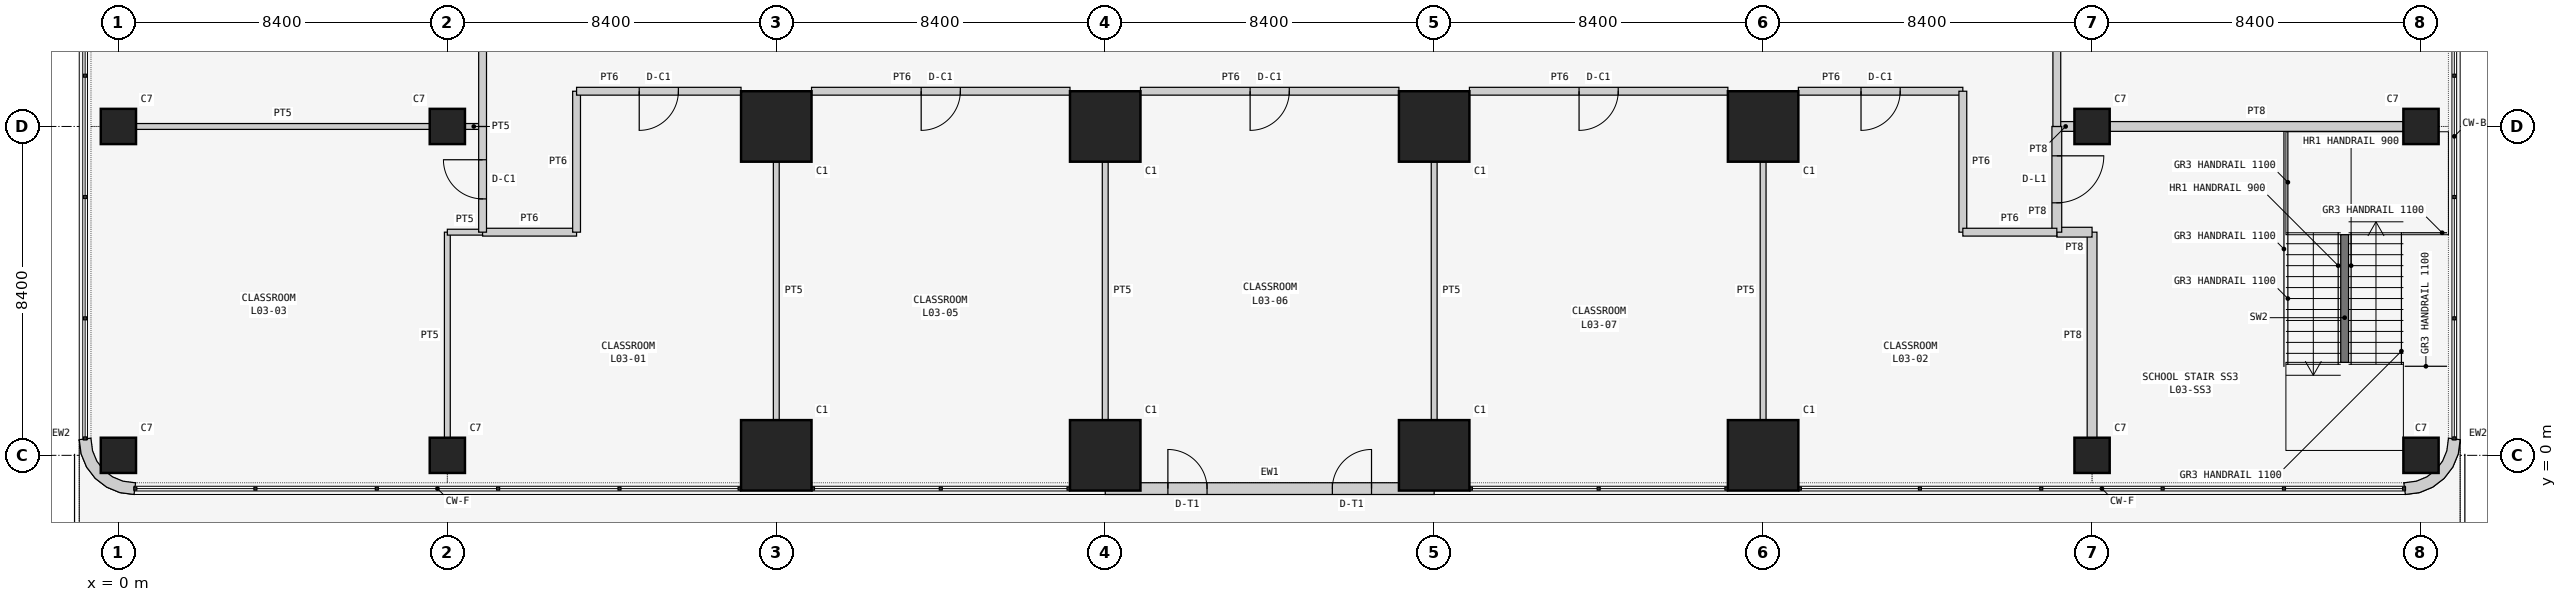
"""IFC4 building model, lengths in metres.
Left out: names, types, materials, properties, quantities, classifications, styles, units other than length and angle.
Written with IfcOpenShell. Run it as: python <this file> out.ifc"""

import sys

from ifc_helpers import new_model, si_unit, direction, frame, frame_2d, origin, origin_2d, place, context, subcontext, project, spatial, polyline, rectangle, outline, extrude, element, fill, save


model = new_model("IFC4")
c1 = context("Model", 3, precision=1e-05, world=origin(), true_north=direction((0.0, 1.0)))
c2 = subcontext(c1, "Body", "Model", "MODEL_VIEW")
j1 = project(units=[si_unit("LENGTHUNIT", "METRE"), si_unit("PLANEANGLEUNIT", "RADIAN")], contexts=[c1])
p1 = place(None, origin())
s1 = spatial("IfcSite", under=j1, at=p1, CompositionType="ELEMENT")
p2 = place(p1, origin())
s2 = spatial("IfcBuilding", under=s1, at=p2, CompositionType="ELEMENT")
p3 = place(p2, frame((0.0, 0.0, 15.0)))
s3 = spatial("IfcBuildingStorey", under=s2, at=p3, CompositionType="ELEMENT", Elevation=15.0)
for number, where, z_axis, x_axis in (
    (1, (0.0, 0.0, 0.0), (0.0, 0.0, 1.0), (1.0, 0.0, 0.0)),
    (2, (0.0, 8.4, 0.0), (0.0, 0.0, 1.0), (1.0, 0.0, 0.0)),
    (3, (8.4, 0.0, 0.0), (0.0, 0.0, 1.0), (1.0, 0.0, 0.0)),
    (4, (8.4, 8.4, 0.0), (0.0, 0.0, 1.0), (1.0, 0.0, 0.0)),
):
    element("IfcColumn", number, at=place(p3, frame(where, z_axis=z_axis, x_axis=x_axis)), inside=s3, PredefinedType="COLUMN", context=c2, shape_type="SweptSolid", body=[
        extrude(rectangle(XDim=0.9, YDim=0.9, at=origin_2d()), origin(), (0.0, 0.0, 1.0), 4.5),
    ])
for number, where, z_axis, x_axis in (
    (5, (16.8, 0.0, 0.0), (0.0, 0.0, 1.0), (1.0, 0.0, 0.0)),
    (6, (16.8, 8.4, 0.0), (0.0, 0.0, 1.0), (1.0, 0.0, 0.0)),
    (7, (25.2, 0.0, 0.0), (0.0, 0.0, 1.0), (1.0, 0.0, 0.0)),
    (8, (25.2, 8.4, 0.0), (0.0, 0.0, 1.0), (1.0, 0.0, 0.0)),
    (9, (33.6, 0.0, 0.0), (0.0, 0.0, 1.0), (1.0, 0.0, 0.0)),
    (10, (33.6, 8.4, 0.0), (0.0, 0.0, 1.0), (1.0, 0.0, 0.0)),
    (11, (42.0, 0.0, 0.0), (0.0, 0.0, 1.0), (1.0, 0.0, 0.0)),
    (12, (42.0, 8.4, 0.0), (0.0, 0.0, 1.0), (1.0, 0.0, 0.0)),
):
    element("IfcColumn", number, at=place(p3, frame(where, z_axis=z_axis, x_axis=x_axis)), inside=s3, PredefinedType="COLUMN", context=c2, shape_type="SweptSolid", body=[
        extrude(rectangle(XDim=1.8, YDim=1.8, at=origin_2d()), origin(), (0.0, 0.0, 1.0), 4.5),
    ])
for number, where, z_axis, x_axis in (
    (13, (50.4, 0.0, 0.0), (0.0, 0.0, 1.0), (1.0, 0.0, 0.0)),
    (14, (50.4, 8.4, 0.0), (0.0, 0.0, 1.0), (1.0, 0.0, 0.0)),
    (15, (58.8, 0.0, 0.0), (0.0, 0.0, 1.0), (1.0, 0.0, 0.0)),
    (16, (58.8, 8.4, 0.0), (0.0, 0.0, 1.0), (1.0, 0.0, 0.0)),
):
    element("IfcColumn", number, at=place(p3, frame(where, z_axis=z_axis, x_axis=x_axis)), inside=s3, PredefinedType="COLUMN", context=c2, shape_type="SweptSolid", body=[
        extrude(rectangle(XDim=0.9, YDim=0.9, at=origin_2d()), origin(), (0.0, 0.0, 1.0), 4.5),
    ])
p4 = place(p3, frame((25.2, -0.85, 0.0), z_axis=(0.0, 0.0, 1.0), x_axis=(1.0, 0.0, 0.0)))
e17 = element("IfcWall", 17, at=p4, inside=s3, PredefinedType="SOLIDWALL", context=c2, shape_type="SweptSolid", body=[
    extrude(rectangle(XDim=8.4, YDim=0.3, at=frame_2d((4.2, 0.0))), origin(), (0.0, 0.0, 1.0), 4.3),
])
p5 = place(p4, frame((1.6, 0.0, 0.0)))
e18 = element("IfcOpeningElement", 18, at=p5, cuts=e17, PredefinedType="OPENING", context=c2, shape_type="SweptSolid", body=[
    extrude(rectangle(XDim=1.0, YDim=2.4, at=frame_2d((0.5, 1.2))), frame((0.0, 0.16, 0.0), z_axis=(0.0, -1.0, 0.0), x_axis=(1.0, 0.0, 0.0)), (0.0, 0.0, 1.0), 0.32),
])
p6 = place(p4, frame((5.8, 0.0, 0.0)))
e19 = element("IfcOpeningElement", 19, at=p6, cuts=e17, PredefinedType="OPENING", context=c2, shape_type="SweptSolid", body=[
    extrude(rectangle(XDim=1.0, YDim=2.4, at=frame_2d((0.5, 1.2))), frame((0.0, 0.16, 0.0), z_axis=(0.0, -1.0, 0.0), x_axis=(1.0, 0.0, 0.0)), (0.0, 0.0, 1.0), 0.32),
])
p7 = place(p3, frame((-0.848, 0.445, 0.0), z_axis=(0.0, 0.0, 1.0), x_axis=(-0.707106781187, -0.707106781187, 0.0)))
e20 = element("IfcWall", 20, at=p7, inside=s3, PredefinedType="SOLIDWALL", context=c2, shape_type="SweptSolid", body=[
    extrude(outline(polyline([(0.139, 1.904), (-0.101, 1.72), (-0.087, 1.706), (0.1, 1.463), (0.209, 1.198), (0.247, 0.914), (0.209, 0.63), (0.1, 0.365), (-0.087, 0.122), (-0.101, 0.108), (0.139, -0.076), (0.362, 0.214), (0.502, 0.552), (0.549, 0.914), (0.502, 1.276), (0.362, 1.614), (0.139, 1.904)])), origin(), (0.0, 0.0, 1.0), 4.3),
])
p8 = place(p3, frame((58.355, -0.848, 0.0), z_axis=(0.0, 0.0, 1.0), x_axis=(0.707106781187, -0.707106781187, 0.0)))
e21 = element("IfcWall", 21, at=p8, inside=s3, PredefinedType="SOLIDWALL", context=c2, shape_type="SweptSolid", body=[
    extrude(outline(polyline([(0.139, 1.904), (-0.101, 1.72), (-0.087, 1.706), (0.1, 1.463), (0.209, 1.198), (0.247, 0.914), (0.209, 0.63), (0.1, 0.365), (-0.087, 0.122), (-0.101, 0.108), (0.139, -0.076), (0.362, 0.214), (0.502, 0.552), (0.549, 0.914), (0.502, 1.276), (0.362, 1.614), (0.139, 1.904)])), origin(), (0.0, 0.0, 1.0), 4.3),
])
p9 = place(p3, frame((50.4, 0.45, 0.0), z_axis=(0.0, 0.0, 1.0), x_axis=(0.0, 1.0, 0.0)))
e22 = element("IfcWall", 22, at=p9, inside=s3, PredefinedType="SOLIDWALL", context=c2, shape_type="SweptSolid", body=[
    extrude(rectangle(XDim=5.25, YDim=0.25, at=frame_2d((2.625, 0.0))), origin(), (0.0, 0.0, 1.0), 3.543),
])
p10 = place(p3, frame((50.4, 5.7, 0.0), z_axis=(0.0, 0.0, 1.0), x_axis=(-1.0, 0.0, 0.0)))
e23 = element("IfcWall", 23, at=p10, inside=s3, PredefinedType="SOLIDWALL", context=c2, shape_type="SweptSolid", body=[
    extrude(rectangle(XDim=0.9, YDim=0.25, at=frame_2d((0.45, 0.0))), origin(), (0.0, 0.0, 1.0), 4.3),
])
p11 = place(p3, frame((49.5, 8.4, 0.0), z_axis=(0.0, 0.0, 1.0), x_axis=(1.0, 0.0, 0.0)))
e24 = element("IfcWall", 24, at=p11, inside=s3, PredefinedType="SOLIDWALL", context=c2, shape_type="SweptSolid", body=[
    extrude(rectangle(XDim=0.45, YDim=0.25, at=frame_2d((0.225, 0.0))), origin(), (0.0, 0.0, 1.0), 3.543),
])
p12 = place(p3, frame((50.85, 8.4, 0.0), z_axis=(0.0, 0.0, 1.0), x_axis=(1.0, 0.0, 0.0)))
e25 = element("IfcWall", 25, at=p12, inside=s3, PredefinedType="SOLIDWALL", context=c2, shape_type="SweptSolid", body=[
    extrude(rectangle(XDim=7.5, YDim=0.25, at=frame_2d((3.75, 0.0))), origin(), (0.0, 0.0, 1.0), 3.543),
])
p13 = place(p3, frame((49.5, 5.7, 0.0), z_axis=(0.0, 0.0, 1.0), x_axis=(0.0, 1.0, 0.0)))
e26 = element("IfcWall", 26, at=p13, inside=s3, PredefinedType="SOLIDWALL", context=c2, shape_type="SweptSolid", body=[
    extrude(rectangle(XDim=2.7, YDim=0.25, at=frame_2d((1.35, 0.0))), origin(), (0.0, 0.0, 1.0), 4.3),
])
p14 = place(p13, frame((0.75, 0.0, 0.0)))
e27 = element("IfcOpeningElement", 27, at=p14, cuts=e26, PredefinedType="OPENING", context=c2, shape_type="SweptSolid", body=[
    extrude(rectangle(XDim=1.2, YDim=2.1, at=frame_2d((0.6, 1.05))), frame((0.0, 0.135, 0.0), z_axis=(0.0, -1.0, 0.0), x_axis=(1.0, 0.0, 0.0)), (0.0, 0.0, 1.0), 0.27),
])
p15 = place(p3, frame((8.4, 0.45, 0.0), z_axis=(0.0, 0.0, 1.0), x_axis=(0.0, 1.0, 0.0)))
e28 = element("IfcWall", 28, at=p15, inside=s3, PredefinedType="PARTITIONING", context=c2, shape_type="SweptSolid", body=[
    extrude(rectangle(XDim=5.25, YDim=0.15, at=frame_2d((2.625, 0.0))), origin(), (0.0, 0.0, 1.0), 3.543),
])
p16 = place(p3, frame((8.4, 5.7, 0.0), z_axis=(0.0, 0.0, 1.0), x_axis=(1.0, 0.0, 0.0)))
e29 = element("IfcWall", 29, at=p16, inside=s3, PredefinedType="PARTITIONING", context=c2, shape_type="SweptSolid", body=[
    extrude(rectangle(XDim=0.9, YDim=0.15, at=frame_2d((0.45, 0.0))), origin(), (0.0, 0.0, 1.0), 4.3),
])
p17 = place(p3, frame((16.8, 7.5, 0.0), z_axis=(0.0, 0.0, 1.0), x_axis=(0.0, -1.0, 0.0)))
e30 = element("IfcWall", 30, at=p17, inside=s3, PredefinedType="PARTITIONING", context=c2, shape_type="SweptSolid", body=[
    extrude(rectangle(XDim=6.6, YDim=0.15, at=frame_2d((3.3, 0.0))), origin(), (0.0, 0.0, 1.0), 3.543),
])
p18 = place(p3, frame((9.3, 5.7, 0.0), z_axis=(0.0, 0.0, 1.0), x_axis=(1.0, 0.0, 0.0)))
e31 = element("IfcWall", 31, at=p18, inside=s3, PredefinedType="PARTITIONING", context=c2, shape_type="SweptSolid", body=[
    extrude(rectangle(XDim=2.4, YDim=0.2, at=frame_2d((1.2, 0.0))), origin(), (0.0, 0.0, 1.0), 4.3),
])
p19 = place(p3, frame((11.7, 5.7, 0.0), z_axis=(0.0, 0.0, 1.0), x_axis=(0.0, 1.0, 0.0)))
e32 = element("IfcWall", 32, at=p19, inside=s3, PredefinedType="PARTITIONING", context=c2, shape_type="SweptSolid", body=[
    extrude(rectangle(XDim=3.6, YDim=0.2, at=frame_2d((1.8, 0.0))), origin(), (0.0, 0.0, 1.0), 4.3),
])
p20 = place(p3, frame((11.7, 9.3, 0.0), z_axis=(0.0, 0.0, 1.0), x_axis=(1.0, 0.0, 0.0)))
e33 = element("IfcWall", 33, at=p20, inside=s3, PredefinedType="PARTITIONING", context=c2, shape_type="SweptSolid", body=[
    extrude(rectangle(XDim=4.2, YDim=0.2, at=frame_2d((2.1, 0.0))), origin(), (0.0, 0.0, 1.0), 4.3),
])
p21 = place(p20, frame((1.6, 0.0, 0.0)))
e34 = element("IfcOpeningElement", 34, at=p21, cuts=e33, PredefinedType="OPENING", context=c2, shape_type="SweptSolid", body=[
    extrude(rectangle(XDim=1.0, YDim=2.1, at=frame_2d((0.5, 1.05))), frame((0.0, 0.11, 0.0), z_axis=(0.0, -1.0, 0.0), x_axis=(1.0, 0.0, 0.0)), (0.0, 0.0, 1.0), 0.22),
])
p22 = place(p3, frame((42.0, 0.9, 0.0), z_axis=(0.0, 0.0, 1.0), x_axis=(0.0, 1.0, 0.0)))
e35 = element("IfcWall", 35, at=p22, inside=s3, PredefinedType="PARTITIONING", context=c2, shape_type="SweptSolid", body=[
    extrude(rectangle(XDim=6.6, YDim=0.15, at=frame_2d((3.3, 0.0))), origin(), (0.0, 0.0, 1.0), 3.543),
])
p23 = place(p3, frame((42.9, 9.3, 0.0), z_axis=(0.0, 0.0, 1.0), x_axis=(1.0, 0.0, 0.0)))
e36 = element("IfcWall", 36, at=p23, inside=s3, PredefinedType="PARTITIONING", context=c2, shape_type="SweptSolid", body=[
    extrude(rectangle(XDim=4.2, YDim=0.2, at=frame_2d((2.1, 0.0))), origin(), (0.0, 0.0, 1.0), 4.3),
])
p24 = place(p23, frame((1.6, 0.0, 0.0)))
e37 = element("IfcOpeningElement", 37, at=p24, cuts=e36, PredefinedType="OPENING", context=c2, shape_type="SweptSolid", body=[
    extrude(rectangle(XDim=1.0, YDim=2.1, at=frame_2d((0.5, 1.05))), frame((0.0, 0.11, 0.0), z_axis=(0.0, -1.0, 0.0), x_axis=(1.0, 0.0, 0.0)), (0.0, 0.0, 1.0), 0.22),
])
p25 = place(p3, frame((47.1, 9.3, 0.0), z_axis=(0.0, 0.0, 1.0), x_axis=(0.0, -1.0, 0.0)))
e38 = element("IfcWall", 38, at=p25, inside=s3, PredefinedType="PARTITIONING", context=c2, shape_type="SweptSolid", body=[
    extrude(rectangle(XDim=3.6, YDim=0.2, at=frame_2d((1.8, 0.0))), origin(), (0.0, 0.0, 1.0), 4.3),
])
p26 = place(p3, frame((47.1, 5.7, 0.0), z_axis=(0.0, 0.0, 1.0), x_axis=(1.0, 0.0, 0.0)))
e39 = element("IfcWall", 39, at=p26, inside=s3, PredefinedType="PARTITIONING", context=c2, shape_type="SweptSolid", body=[
    extrude(rectangle(XDim=2.4, YDim=0.2, at=frame_2d((1.2, 0.0))), origin(), (0.0, 0.0, 1.0), 4.3),
])
p27 = place(p3, frame((0.45, 8.4, 0.0), z_axis=(0.0, 0.0, 1.0), x_axis=(1.0, 0.0, 0.0)))
e40 = element("IfcWall", 40, at=p27, inside=s3, PredefinedType="PARTITIONING", context=c2, shape_type="SweptSolid", body=[
    extrude(rectangle(XDim=7.5, YDim=0.15, at=frame_2d((3.75, 0.0))), origin(), (0.0, 0.0, 1.0), 3.543),
])
p28 = place(p3, frame((8.85, 8.4, 0.0), z_axis=(0.0, 0.0, 1.0), x_axis=(1.0, 0.0, 0.0)))
e41 = element("IfcWall", 41, at=p28, inside=s3, PredefinedType="PARTITIONING", context=c2, shape_type="SweptSolid", body=[
    extrude(rectangle(XDim=0.45, YDim=0.15, at=frame_2d((0.225, 0.0))), origin(), (0.0, 0.0, 1.0), 3.543),
])
p29 = place(p3, frame((9.3, 8.4, 0.0), z_axis=(0.0, 0.0, 1.0), x_axis=(0.0, -1.0, 0.0)))
e42 = element("IfcWall", 42, at=p29, inside=s3, PredefinedType="PARTITIONING", context=c2, shape_type="SweptSolid", body=[
    extrude(rectangle(XDim=2.7, YDim=0.2, at=frame_2d((1.35, 0.0))), origin(), (0.0, 0.0, 1.0), 4.3),
])
p30 = place(p29, frame((0.85, 0.0, 0.0)))
e43 = element("IfcOpeningElement", 43, at=p30, cuts=e42, PredefinedType="OPENING", context=c2, shape_type="SweptSolid", body=[
    extrude(rectangle(XDim=1.0, YDim=2.1, at=frame_2d((0.5, 1.05))), frame((0.0, 0.11, 0.0), z_axis=(0.0, -1.0, 0.0), x_axis=(1.0, 0.0, 0.0)), (0.0, 0.0, 1.0), 0.22),
])
p31 = place(p3, frame((25.2, 7.5, 0.0), z_axis=(0.0, 0.0, 1.0), x_axis=(0.0, -1.0, 0.0)))
e44 = element("IfcWall", 44, at=p31, inside=s3, PredefinedType="PARTITIONING", context=c2, shape_type="SweptSolid", body=[
    extrude(rectangle(XDim=6.6, YDim=0.15, at=frame_2d((3.3, 0.0))), origin(), (0.0, 0.0, 1.0), 3.543),
])
p32 = place(p3, frame((17.7, 9.3, 0.0), z_axis=(0.0, 0.0, 1.0), x_axis=(1.0, 0.0, 0.0)))
e45 = element("IfcWall", 45, at=p32, inside=s3, PredefinedType="PARTITIONING", context=c2, shape_type="SweptSolid", body=[
    extrude(rectangle(XDim=6.6, YDim=0.2, at=frame_2d((3.3, 0.0))), origin(), (0.0, 0.0, 1.0), 4.3),
])
p33 = place(p32, frame((2.8, 0.0, 0.0)))
e46 = element("IfcOpeningElement", 46, at=p33, cuts=e45, PredefinedType="OPENING", context=c2, shape_type="SweptSolid", body=[
    extrude(rectangle(XDim=1.0, YDim=2.1, at=frame_2d((0.5, 1.05))), frame((0.0, 0.11, 0.0), z_axis=(0.0, -1.0, 0.0), x_axis=(1.0, 0.0, 0.0)), (0.0, 0.0, 1.0), 0.22),
])
p34 = place(p3, frame((33.6, 7.5, 0.0), z_axis=(0.0, 0.0, 1.0), x_axis=(0.0, -1.0, 0.0)))
e47 = element("IfcWall", 47, at=p34, inside=s3, PredefinedType="PARTITIONING", context=c2, shape_type="SweptSolid", body=[
    extrude(rectangle(XDim=6.6, YDim=0.15, at=frame_2d((3.3, 0.0))), origin(), (0.0, 0.0, 1.0), 3.543),
])
p35 = place(p3, frame((26.1, 9.3, 0.0), z_axis=(0.0, 0.0, 1.0), x_axis=(1.0, 0.0, 0.0)))
e48 = element("IfcWall", 48, at=p35, inside=s3, PredefinedType="PARTITIONING", context=c2, shape_type="SweptSolid", body=[
    extrude(rectangle(XDim=6.6, YDim=0.2, at=frame_2d((3.3, 0.0))), origin(), (0.0, 0.0, 1.0), 4.3),
])
p36 = place(p35, frame((2.8, 0.0, 0.0)))
e49 = element("IfcOpeningElement", 49, at=p36, cuts=e48, PredefinedType="OPENING", context=c2, shape_type="SweptSolid", body=[
    extrude(rectangle(XDim=1.0, YDim=2.1, at=frame_2d((0.5, 1.05))), frame((0.0, 0.11, 0.0), z_axis=(0.0, -1.0, 0.0), x_axis=(1.0, 0.0, 0.0)), (0.0, 0.0, 1.0), 0.22),
])
p37 = place(p3, frame((34.5, 9.3, 0.0), z_axis=(0.0, 0.0, 1.0), x_axis=(1.0, 0.0, 0.0)))
e50 = element("IfcWall", 50, at=p37, inside=s3, PredefinedType="PARTITIONING", context=c2, shape_type="SweptSolid", body=[
    extrude(rectangle(XDim=6.6, YDim=0.2, at=frame_2d((3.3, 0.0))), origin(), (0.0, 0.0, 1.0), 4.3),
])
p38 = place(p37, frame((2.8, 0.0, 0.0)))
e51 = element("IfcOpeningElement", 51, at=p38, cuts=e50, PredefinedType="OPENING", context=c2, shape_type="SweptSolid", body=[
    extrude(rectangle(XDim=1.0, YDim=2.1, at=frame_2d((0.5, 1.05))), frame((0.0, 0.11, 0.0), z_axis=(0.0, -1.0, 0.0), x_axis=(1.0, 0.0, 0.0)), (0.0, 0.0, 1.0), 0.22),
])
p39 = place(p3, frame((9.3, 15.9, 0.0), z_axis=(0.0, 0.0, 1.0), x_axis=(0.0, -1.0, 0.0)))
e52 = element("IfcWall", 52, at=p39, inside=s3, PredefinedType="PARTITIONING", context=c2, shape_type="SweptSolid", body=[
    extrude(rectangle(XDim=7.5, YDim=0.2, at=frame_2d((3.75, 0.0))), origin(), (0.0, 0.0, 1.0), 4.3),
])
p40 = place(p39, frame((3.25, 0.0, 0.0)))
e53 = element("IfcOpeningElement", 53, at=p40, cuts=e52, PredefinedType="OPENING", context=c2, shape_type="SweptSolid", body=[
    extrude(rectangle(XDim=1.0, YDim=2.1, at=frame_2d((0.5, 1.05))), frame((0.0, 0.11, 0.0), z_axis=(0.0, -1.0, 0.0), x_axis=(1.0, 0.0, 0.0)), (0.0, 0.0, 1.0), 0.22),
])
p41 = place(p3, frame((49.5, 8.4, 0.0), z_axis=(0.0, 0.0, 1.0), x_axis=(0.0, 1.0, 0.0)))
e54 = element("IfcWall", 54, at=p41, inside=s3, PredefinedType="PARTITIONING", context=c2, shape_type="SweptSolid", body=[
    extrude(rectangle(XDim=7.5, YDim=0.2, at=frame_2d((3.75, 0.0))), origin(), (0.0, 0.0, 1.0), 4.3),
])
p42 = place(p41, frame((3.25, 0.0, 0.0)))
e55 = element("IfcOpeningElement", 55, at=p42, cuts=e54, PredefinedType="OPENING", context=c2, shape_type="SweptSolid", body=[
    extrude(rectangle(XDim=1.0, YDim=2.1, at=frame_2d((0.5, 1.05))), frame((0.0, 0.11, 0.0), z_axis=(0.0, -1.0, 0.0), x_axis=(1.0, 0.0, 0.0)), (0.0, 0.0, 1.0), 0.22),
])
p43 = place(p3, frame((56.85, 2.375, 0.0), z_axis=(0.0, 0.0, 1.0), x_axis=(0.0, 1.0, 0.0)))
e56 = element("IfcWall", 56, at=p43, inside=s3, PredefinedType="SOLIDWALL", context=c2, shape_type="SweptSolid", body=[
    extrude(rectangle(XDim=3.26, YDim=0.2, at=frame_2d((1.63, 0.0))), origin(), (0.0, 0.0, 1.0), 4.5),
])
p44 = place(p5, origin())
e57 = element("IfcDoor", 57, at=p44, inside=s3, OperationType="SINGLE_SWING_LEFT", PredefinedType="DOOR", context=c2, shape_type="SweptSolid", body=[
    extrude(rectangle(XDim=1.0, YDim=2.4, at=frame_2d((0.5, 1.2))), frame((0.0, 0.025, 0.0), z_axis=(0.0, -1.0, 0.0), x_axis=(1.0, 0.0, 0.0)), (0.0, 0.0, 1.0), 0.05),
])
fill(e18, e57)
p45 = place(p6, origin())
e58 = element("IfcDoor", 58, at=p45, inside=s3, OperationType="SINGLE_SWING_RIGHT", PredefinedType="DOOR", context=c2, shape_type="SweptSolid", body=[
    extrude(rectangle(XDim=1.0, YDim=2.4, at=frame_2d((0.5, 1.2))), frame((0.0, 0.025, 0.0), z_axis=(0.0, -1.0, 0.0), x_axis=(1.0, 0.0, 0.0)), (0.0, 0.0, 1.0), 0.05),
])
fill(e19, e58)
p46 = place(p14, frame((1.2, 0.0, 0.0), z_axis=(0.0, 0.0, 1.0), x_axis=(-1.0, 0.0, 0.0)))
e59 = element("IfcDoor", 59, at=p46, inside=s3, OperationType="SINGLE_SWING_LEFT", PredefinedType="DOOR", context=c2, shape_type="SweptSolid", body=[
    extrude(rectangle(XDim=1.2, YDim=2.1, at=frame_2d((0.6, 1.05))), frame((0.0, 0.025, 0.0), z_axis=(0.0, -1.0, 0.0), x_axis=(1.0, 0.0, 0.0)), (0.0, 0.0, 1.0), 0.05),
])
fill(e27, e59)
p47 = place(p21, frame((1.0, 0.0, 0.0), z_axis=(0.0, 0.0, 1.0), x_axis=(-1.0, 0.0, 0.0)))
e60 = element("IfcDoor", 60, at=p47, inside=s3, OperationType="SINGLE_SWING_RIGHT", PredefinedType="DOOR", context=c2, shape_type="SweptSolid", body=[
    extrude(rectangle(XDim=1.0, YDim=2.1, at=frame_2d((0.5, 1.05))), frame((0.0, 0.025, 0.0), z_axis=(0.0, -1.0, 0.0), x_axis=(1.0, 0.0, 0.0)), (0.0, 0.0, 1.0), 0.05),
])
fill(e34, e60)
p48 = place(p24, frame((1.0, 0.0, 0.0), z_axis=(0.0, 0.0, 1.0), x_axis=(-1.0, 0.0, 0.0)))
e61 = element("IfcDoor", 61, at=p48, inside=s3, OperationType="SINGLE_SWING_RIGHT", PredefinedType="DOOR", context=c2, shape_type="SweptSolid", body=[
    extrude(rectangle(XDim=1.0, YDim=2.1, at=frame_2d((0.5, 1.05))), frame((0.0, 0.025, 0.0), z_axis=(0.0, -1.0, 0.0), x_axis=(1.0, 0.0, 0.0)), (0.0, 0.0, 1.0), 0.05),
])
fill(e37, e61)
p49 = place(p30, frame((1.0, 0.0, 0.0), z_axis=(0.0, 0.0, 1.0), x_axis=(-1.0, 0.0, 0.0)))
e62 = element("IfcDoor", 62, at=p49, inside=s3, OperationType="SINGLE_SWING_RIGHT", PredefinedType="DOOR", context=c2, shape_type="SweptSolid", body=[
    extrude(rectangle(XDim=1.0, YDim=2.1, at=frame_2d((0.5, 1.05))), frame((0.0, 0.025, 0.0), z_axis=(0.0, -1.0, 0.0), x_axis=(1.0, 0.0, 0.0)), (0.0, 0.0, 1.0), 0.05),
])
fill(e43, e62)
p50 = place(p33, frame((1.0, 0.0, 0.0), z_axis=(0.0, 0.0, 1.0), x_axis=(-1.0, 0.0, 0.0)))
e63 = element("IfcDoor", 63, at=p50, inside=s3, OperationType="SINGLE_SWING_RIGHT", PredefinedType="DOOR", context=c2, shape_type="SweptSolid", body=[
    extrude(rectangle(XDim=1.0, YDim=2.1, at=frame_2d((0.5, 1.05))), frame((0.0, 0.025, 0.0), z_axis=(0.0, -1.0, 0.0), x_axis=(1.0, 0.0, 0.0)), (0.0, 0.0, 1.0), 0.05),
])
fill(e46, e63)
p51 = place(p36, frame((1.0, 0.0, 0.0), z_axis=(0.0, 0.0, 1.0), x_axis=(-1.0, 0.0, 0.0)))
e64 = element("IfcDoor", 64, at=p51, inside=s3, OperationType="SINGLE_SWING_RIGHT", PredefinedType="DOOR", context=c2, shape_type="SweptSolid", body=[
    extrude(rectangle(XDim=1.0, YDim=2.1, at=frame_2d((0.5, 1.05))), frame((0.0, 0.025, 0.0), z_axis=(0.0, -1.0, 0.0), x_axis=(1.0, 0.0, 0.0)), (0.0, 0.0, 1.0), 0.05),
])
fill(e49, e64)
p52 = place(p38, frame((1.0, 0.0, 0.0), z_axis=(0.0, 0.0, 1.0), x_axis=(-1.0, 0.0, 0.0)))
e65 = element("IfcDoor", 65, at=p52, inside=s3, OperationType="SINGLE_SWING_RIGHT", PredefinedType="DOOR", context=c2, shape_type="SweptSolid", body=[
    extrude(rectangle(XDim=1.0, YDim=2.1, at=frame_2d((0.5, 1.05))), frame((0.0, 0.025, 0.0), z_axis=(0.0, -1.0, 0.0), x_axis=(1.0, 0.0, 0.0)), (0.0, 0.0, 1.0), 0.05),
])
fill(e51, e65)
save(model, sys.argv[1])
